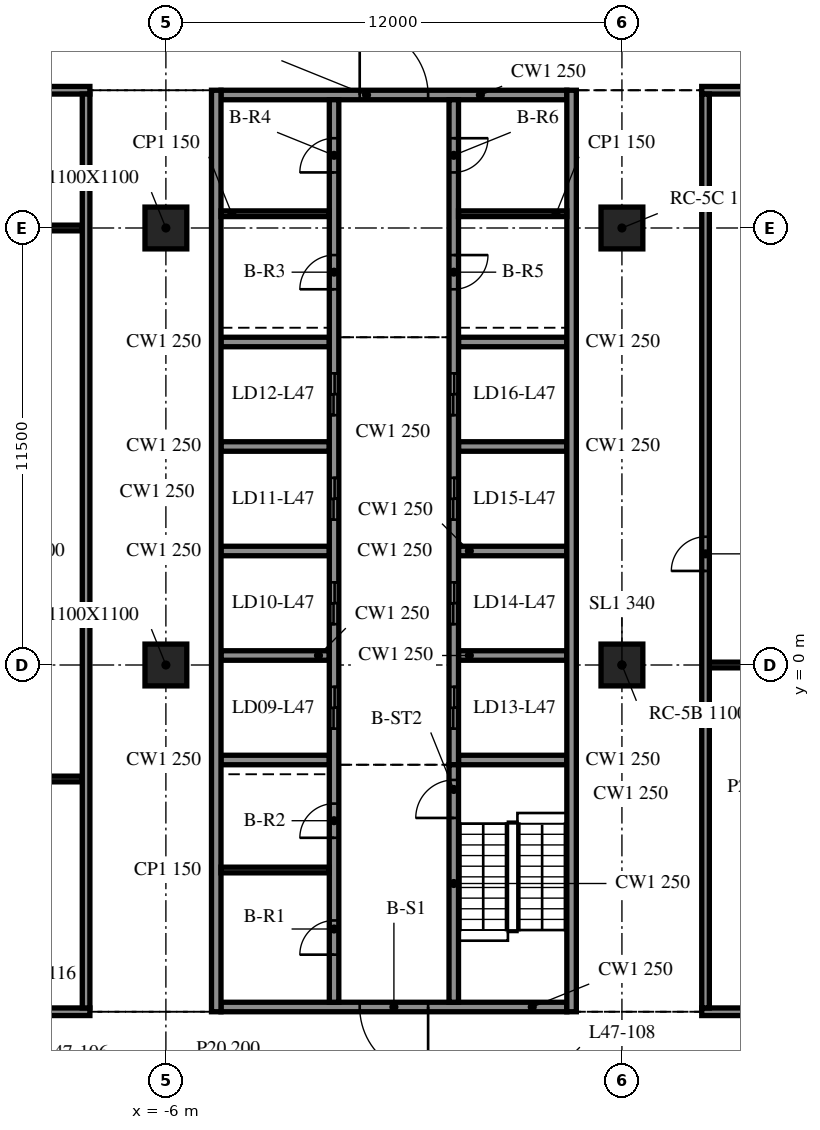
"""IFC4 building model, lengths in metres.
Left out: names, types, materials, properties, quantities, classifications, styles, units other than length and angle.
Written with IfcOpenShell. Run it as: python <this file> out.ifc"""

import sys

from ifc_helpers import new_model, si_unit, direction, frame, frame_2d, origin, origin_2d, place, context, subcontext, project, spatial, rectangle, extrude, element, fill, save


model = new_model("IFC4")
c1 = context("Model", 3, precision=1e-05, world=origin(), true_north=direction((0.0, 1.0)))
c2 = subcontext(c1, "Body", "Model", "MODEL_VIEW")
j1 = project(units=[si_unit("LENGTHUNIT", "METRE"), si_unit("PLANEANGLEUNIT", "RADIAN")], contexts=[c1])
p1 = place(None, origin())
s1 = spatial("IfcSite", under=j1, at=p1, CompositionType="ELEMENT")
p2 = place(p1, origin())
s2 = spatial("IfcBuilding", under=s1, at=p2, CompositionType="ELEMENT")
p3 = place(p2, frame((0.0, 0.0, 197.7)))
s3 = spatial("IfcBuildingStorey", under=s2, at=p3, CompositionType="ELEMENT", Elevation=197.7)
for number, where, z_axis, x_axis in (
    (1, (-6.0, 0.0, -0.34), (0.0, 0.0, 1.0), (1.0, 0.0, 0.0)),
    (2, (-6.0, 11.5, -0.34), (0.0, 0.0, 1.0), (1.0, 0.0, 0.0)),
    (3, (6.0, 0.0, -0.34), (0.0, 0.0, 1.0), (1.0, 0.0, 0.0)),
    (4, (6.0, 11.5, -0.34), (0.0, 0.0, 1.0), (1.0, 0.0, 0.0)),
):
    element("IfcColumn", number, at=place(p3, frame(where, z_axis=z_axis, x_axis=x_axis)), inside=s3, PredefinedType="COLUMN", context=c2, shape_type="SweptSolid", body=[
        extrude(rectangle(XDim=1.1, YDim=1.1, at=origin_2d()), origin(), (0.0, 0.0, 1.0), 3.8),
    ])
for number, where, z_axis, x_axis in (
    (5, (-4.675, 15.125, 0.0), (0.0, 0.0, 1.0), (0.0, -1.0, 0.0)),
    (6, (4.675, -9.125, 0.0), (0.0, 0.0, 1.0), (0.0, 1.0, 0.0)),
):
    element("IfcWall", number, at=place(p3, frame(where, z_axis=z_axis, x_axis=x_axis)), inside=s3, PredefinedType="SOLIDWALL", context=c2, shape_type="SweptSolid", body=[
        extrude(rectangle(XDim=24.25, YDim=0.25, at=frame_2d((12.125, 0.0))), origin(), (0.0, 0.0, 1.0), 3.46),
    ])
p4 = place(p3, frame((4.55, -9.0, 0.0), z_axis=(0.0, 0.0, 1.0), x_axis=(-1.0, 0.0, 0.0)))
e7 = element("IfcWall", 7, at=p4, inside=s3, PredefinedType="SOLIDWALL", context=c2, shape_type="SweptSolid", body=[
    extrude(rectangle(XDim=9.1, YDim=0.25, at=frame_2d((4.55, 0.0))), origin(), (0.0, 0.0, 1.0), 3.46),
])
p5 = place(p4, frame((3.65, 0.0, 0.0)))
e8 = element("IfcOpeningElement", 8, at=p5, cuts=e7, PredefinedType="OPENING", context=c2, shape_type="SweptSolid", body=[
    extrude(rectangle(XDim=1.8, YDim=2.1, at=frame_2d((0.9, 1.05))), frame((0.0, 0.135, 0.0), z_axis=(0.0, -1.0, 0.0), x_axis=(1.0, 0.0, 0.0)), (0.0, 0.0, 1.0), 0.27),
])
p6 = place(p3, frame((-4.55, 15.0, 0.0), z_axis=(0.0, 0.0, 1.0), x_axis=(1.0, 0.0, 0.0)))
e9 = element("IfcWall", 9, at=p6, inside=s3, PredefinedType="SOLIDWALL", context=c2, shape_type="SweptSolid", body=[
    extrude(rectangle(XDim=9.1, YDim=0.25, at=frame_2d((4.55, 0.0))), origin(), (0.0, 0.0, 1.0), 3.46),
])
p7 = place(p6, frame((3.65, 0.0, 0.0)))
e10 = element("IfcOpeningElement", 10, at=p7, cuts=e9, PredefinedType="OPENING", context=c2, shape_type="SweptSolid", body=[
    extrude(rectangle(XDim=1.8, YDim=2.1, at=frame_2d((0.9, 1.05))), frame((0.0, 0.135, 0.0), z_axis=(0.0, -1.0, 0.0), x_axis=(1.0, 0.0, 0.0)), (0.0, 0.0, 1.0), 0.27),
])
p8 = place(p3, frame((-1.575, -8.875, 0.0), z_axis=(0.0, 0.0, 1.0), x_axis=(0.0, 1.0, 0.0)))
e11 = element("IfcWall", 11, at=p8, inside=s3, PredefinedType="SOLIDWALL", context=c2, shape_type="SweptSolid", body=[
    extrude(rectangle(XDim=23.75, YDim=0.25, at=frame_2d((11.875, 0.0))), origin(), (0.0, 0.0, 1.0), 3.46),
])
p9 = place(p8, frame((7.2, 0.0, 0.0)))
e12 = element("IfcOpeningElement", 12, at=p9, cuts=e11, PredefinedType="OPENING", context=c2, shape_type="SweptSolid", body=[
    extrude(rectangle(XDim=1.1, YDim=2.1, at=frame_2d((0.55, 1.05))), frame((0.0, 0.135, 0.0), z_axis=(0.0, -1.0, 0.0), x_axis=(1.0, 0.0, 0.0)), (0.0, 0.0, 1.0), 0.27),
])
p10 = place(p8, frame((9.95, 0.0, 0.0)))
e13 = element("IfcOpeningElement", 13, at=p10, cuts=e11, PredefinedType="OPENING", context=c2, shape_type="SweptSolid", body=[
    extrude(rectangle(XDim=1.1, YDim=2.1, at=frame_2d((0.55, 1.05))), frame((0.0, 0.135, 0.0), z_axis=(0.0, -1.0, 0.0), x_axis=(1.0, 0.0, 0.0)), (0.0, 0.0, 1.0), 0.27),
])
p11 = place(p8, frame((12.7, 0.0, 0.0)))
e14 = element("IfcOpeningElement", 14, at=p11, cuts=e11, PredefinedType="OPENING", context=c2, shape_type="SweptSolid", body=[
    extrude(rectangle(XDim=1.1, YDim=2.1, at=frame_2d((0.55, 1.05))), frame((0.0, 0.135, 0.0), z_axis=(0.0, -1.0, 0.0), x_axis=(1.0, 0.0, 0.0)), (0.0, 0.0, 1.0), 0.27),
])
p12 = place(p8, frame((15.45, 0.0, 0.0)))
e15 = element("IfcOpeningElement", 15, at=p12, cuts=e11, PredefinedType="OPENING", context=c2, shape_type="SweptSolid", body=[
    extrude(rectangle(XDim=1.1, YDim=2.1, at=frame_2d((0.55, 1.05))), frame((0.0, 0.135, 0.0), z_axis=(0.0, -1.0, 0.0), x_axis=(1.0, 0.0, 0.0)), (0.0, 0.0, 1.0), 0.27),
])
p13 = place(p8, frame((1.252, 0.0, 0.0)))
e16 = element("IfcOpeningElement", 16, at=p13, cuts=e11, PredefinedType="OPENING", context=c2, shape_type="SweptSolid", body=[
    extrude(rectangle(XDim=0.9, YDim=2.1, at=frame_2d((0.45, 1.05))), frame((0.0, 0.135, 0.0), z_axis=(0.0, -1.0, 0.0), x_axis=(1.0, 0.0, 0.0)), (0.0, 0.0, 1.0), 0.27),
])
p14 = place(p8, frame((4.327, 0.0, 0.0)))
e17 = element("IfcOpeningElement", 17, at=p14, cuts=e11, PredefinedType="OPENING", context=c2, shape_type="SweptSolid", body=[
    extrude(rectangle(XDim=0.9, YDim=2.1, at=frame_2d((0.45, 1.05))), frame((0.0, 0.135, 0.0), z_axis=(0.0, -1.0, 0.0), x_axis=(1.0, 0.0, 0.0)), (0.0, 0.0, 1.0), 0.27),
])
p15 = place(p8, frame((18.762, 0.0, 0.0)))
e18 = element("IfcOpeningElement", 18, at=p15, cuts=e11, PredefinedType="OPENING", context=c2, shape_type="SweptSolid", body=[
    extrude(rectangle(XDim=0.9, YDim=2.1, at=frame_2d((0.45, 1.05))), frame((0.0, 0.135, 0.0), z_axis=(0.0, -1.0, 0.0), x_axis=(1.0, 0.0, 0.0)), (0.0, 0.0, 1.0), 0.27),
])
p16 = place(p8, frame((21.837, 0.0, 0.0)))
e19 = element("IfcOpeningElement", 19, at=p16, cuts=e11, PredefinedType="OPENING", context=c2, shape_type="SweptSolid", body=[
    extrude(rectangle(XDim=0.9, YDim=2.1, at=frame_2d((0.45, 1.05))), frame((0.0, 0.135, 0.0), z_axis=(0.0, -1.0, 0.0), x_axis=(1.0, 0.0, 0.0)), (0.0, 0.0, 1.0), 0.27),
])
p17 = place(p3, frame((1.575, -8.875, 0.0), z_axis=(0.0, 0.0, 1.0), x_axis=(0.0, 1.0, 0.0)))
e20 = element("IfcWall", 20, at=p17, inside=s3, PredefinedType="SOLIDWALL", context=c2, shape_type="SweptSolid", body=[
    extrude(rectangle(XDim=6.25, YDim=0.25, at=frame_2d((3.125, 0.0))), origin(), (0.0, 0.0, 1.0), 3.46),
])
p18 = place(p17, frame((4.85, 0.0, 0.0)))
e21 = element("IfcOpeningElement", 21, at=p18, cuts=e20, PredefinedType="OPENING", context=c2, shape_type="SweptSolid", body=[
    extrude(rectangle(XDim=1.0, YDim=2.1, at=frame_2d((0.5, 1.05))), frame((0.0, 0.135, 0.0), z_axis=(0.0, -1.0, 0.0), x_axis=(1.0, 0.0, 0.0)), (0.0, 0.0, 1.0), 0.27),
])
p19 = place(p3, frame((1.575, 14.875, 0.0), z_axis=(0.0, 0.0, 1.0), x_axis=(0.0, -1.0, 0.0)))
e22 = element("IfcWall", 22, at=p19, inside=s3, PredefinedType="SOLIDWALL", context=c2, shape_type="SweptSolid", body=[
    extrude(rectangle(XDim=17.5, YDim=0.25, at=frame_2d((8.75, 0.0))), origin(), (0.0, 0.0, 1.0), 3.46),
])
p20 = place(p19, frame((15.45, 0.0, 0.0)))
e23 = element("IfcOpeningElement", 23, at=p20, cuts=e22, PredefinedType="OPENING", context=c2, shape_type="SweptSolid", body=[
    extrude(rectangle(XDim=1.1, YDim=2.1, at=frame_2d((0.55, 1.05))), frame((0.0, 0.135, 0.0), z_axis=(0.0, -1.0, 0.0), x_axis=(1.0, 0.0, 0.0)), (0.0, 0.0, 1.0), 0.27),
])
p21 = place(p19, frame((12.7, 0.0, 0.0)))
e24 = element("IfcOpeningElement", 24, at=p21, cuts=e22, PredefinedType="OPENING", context=c2, shape_type="SweptSolid", body=[
    extrude(rectangle(XDim=1.1, YDim=2.1, at=frame_2d((0.55, 1.05))), frame((0.0, 0.135, 0.0), z_axis=(0.0, -1.0, 0.0), x_axis=(1.0, 0.0, 0.0)), (0.0, 0.0, 1.0), 0.27),
])
p22 = place(p19, frame((9.95, 0.0, 0.0)))
e25 = element("IfcOpeningElement", 25, at=p22, cuts=e22, PredefinedType="OPENING", context=c2, shape_type="SweptSolid", body=[
    extrude(rectangle(XDim=1.1, YDim=2.1, at=frame_2d((0.55, 1.05))), frame((0.0, 0.135, 0.0), z_axis=(0.0, -1.0, 0.0), x_axis=(1.0, 0.0, 0.0)), (0.0, 0.0, 1.0), 0.27),
])
p23 = place(p19, frame((7.2, 0.0, 0.0)))
e26 = element("IfcOpeningElement", 26, at=p23, cuts=e22, PredefinedType="OPENING", context=c2, shape_type="SweptSolid", body=[
    extrude(rectangle(XDim=1.1, YDim=2.1, at=frame_2d((0.55, 1.05))), frame((0.0, 0.135, 0.0), z_axis=(0.0, -1.0, 0.0), x_axis=(1.0, 0.0, 0.0)), (0.0, 0.0, 1.0), 0.27),
])
p24 = place(p19, frame((4.087, 0.0, 0.0)))
e27 = element("IfcOpeningElement", 27, at=p24, cuts=e22, PredefinedType="OPENING", context=c2, shape_type="SweptSolid", body=[
    extrude(rectangle(XDim=0.9, YDim=2.1, at=frame_2d((0.45, 1.05))), frame((0.0, 0.135, 0.0), z_axis=(0.0, -1.0, 0.0), x_axis=(1.0, 0.0, 0.0)), (0.0, 0.0, 1.0), 0.27),
])
p25 = place(p19, frame((1.012, 0.0, 0.0)))
e28 = element("IfcOpeningElement", 28, at=p25, cuts=e22, PredefinedType="OPENING", context=c2, shape_type="SweptSolid", body=[
    extrude(rectangle(XDim=0.9, YDim=2.1, at=frame_2d((0.45, 1.05))), frame((0.0, 0.135, 0.0), z_axis=(0.0, -1.0, 0.0), x_axis=(1.0, 0.0, 0.0)), (0.0, 0.0, 1.0), 0.27),
])
for number, where, z_axis, x_axis in (
    (29, (-4.55, -2.5, 0.0), (0.0, 0.0, 1.0), (1.0, 0.0, 0.0)),
    (30, (-4.55, 0.25, 0.0), (0.0, 0.0, 1.0), (1.0, 0.0, 0.0)),
    (31, (-4.55, 3.0, 0.0), (0.0, 0.0, 1.0), (1.0, 0.0, 0.0)),
    (32, (-4.55, 5.75, 0.0), (0.0, 0.0, 1.0), (1.0, 0.0, 0.0)),
    (33, (-4.55, 8.5, 0.0), (0.0, 0.0, 1.0), (1.0, 0.0, 0.0)),
    (34, (1.7, -2.5, 0.0), (0.0, 0.0, 1.0), (1.0, 0.0, 0.0)),
    (35, (1.7, 0.25, 0.0), (0.0, 0.0, 1.0), (1.0, 0.0, 0.0)),
    (36, (1.7, 3.0, 0.0), (0.0, 0.0, 1.0), (1.0, 0.0, 0.0)),
    (37, (1.7, 5.75, 0.0), (0.0, 0.0, 1.0), (1.0, 0.0, 0.0)),
    (38, (1.7, 8.5, 0.0), (0.0, 0.0, 1.0), (1.0, 0.0, 0.0)),
):
    element("IfcWall", number, at=place(p3, frame(where, z_axis=z_axis, x_axis=x_axis)), inside=s3, PredefinedType="SOLIDWALL", context=c2, shape_type="SweptSolid", body=[
        extrude(rectangle(XDim=2.85, YDim=0.25, at=frame_2d((1.425, 0.0))), origin(), (0.0, 0.0, 1.0), 3.46),
    ])
for number, where, z_axis, x_axis in (
    (39, (-4.55, -5.395, 0.0), (0.0, 0.0, 1.0), (1.0, 0.0, 0.0)),
    (40, (-4.55, 11.875, 0.0), (0.0, 0.0, 1.0), (1.0, 0.0, 0.0)),
    (41, (1.7, 11.875, 0.0), (0.0, 0.0, 1.0), (1.0, 0.0, 0.0)),
):
    element("IfcWall", number, at=place(p3, frame(where, z_axis=z_axis, x_axis=x_axis)), inside=s3, PredefinedType="PARTITIONING", context=c2, shape_type="SweptSolid", body=[
        extrude(rectangle(XDim=2.85, YDim=0.15, at=frame_2d((1.425, 0.0))), origin(), (0.0, 0.0, 1.0), 3.46),
    ])
p26 = place(p3, frame((-16.1, -9.125, 0.0), z_axis=(0.0, 0.0, 1.0), x_axis=(1.0, 0.0, 0.0)))
e42 = element("IfcWall", 42, at=p26, inside=s3, PredefinedType="PARTITIONING", context=c2, shape_type="SweptSolid", body=[
    extrude(rectangle(XDim=8.1, YDim=0.2, at=frame_2d((4.05, 0.0))), origin(), (0.0, 0.0, 1.0), 3.46),
])
p27 = place(p26, frame((3.5, 0.0, 0.0)))
e43 = element("IfcOpeningElement", 43, at=p27, cuts=e42, PredefinedType="OPENING", context=c2, shape_type="SweptSolid", body=[
    extrude(rectangle(XDim=1.0, YDim=2.1, at=frame_2d((0.5, 1.05))), frame((0.0, 0.11, 0.0), z_axis=(0.0, -1.0, 0.0), x_axis=(1.0, 0.0, 0.0)), (0.0, 0.0, 1.0), 0.22),
])
p28 = place(p3, frame((8.1, -9.125, 0.0), z_axis=(0.0, 0.0, 1.0), x_axis=(1.0, 0.0, 0.0)))
e44 = element("IfcWall", 44, at=p28, inside=s3, PredefinedType="PARTITIONING", context=c2, shape_type="SweptSolid", body=[
    extrude(rectangle(XDim=7.7, YDim=0.2, at=frame_2d((3.85, 0.0))), origin(), (0.0, 0.0, 1.0), 3.46),
])
p29 = place(p28, frame((3.3, 0.0, 0.0)))
e45 = element("IfcOpeningElement", 45, at=p29, cuts=e44, PredefinedType="OPENING", context=c2, shape_type="SweptSolid", body=[
    extrude(rectangle(XDim=1.0, YDim=2.1, at=frame_2d((0.5, 1.05))), frame((0.0, 0.11, 0.0), z_axis=(0.0, -1.0, 0.0), x_axis=(1.0, 0.0, 0.0)), (0.0, 0.0, 1.0), 0.22),
])
p30 = place(p3, frame((-15.9, -3.0, 0.0), z_axis=(0.0, 0.0, 1.0), x_axis=(1.0, 0.0, 0.0)))
e46 = element("IfcWall", 46, at=p30, inside=s3, PredefinedType="PARTITIONING", context=c2, shape_type="SweptSolid", body=[
    extrude(rectangle(XDim=7.7, YDim=0.15, at=frame_2d((3.85, 0.0))), origin(), (0.0, 0.0, 1.0), 3.46),
])
p31 = place(p3, frame((8.3, 0.0, 0.0), z_axis=(0.0, 0.0, 1.0), x_axis=(1.0, 0.0, 0.0)))
e47 = element("IfcWall", 47, at=p31, inside=s3, PredefinedType="PARTITIONING", context=c2, shape_type="SweptSolid", body=[
    extrude(rectangle(XDim=7.3, YDim=0.15, at=frame_2d((3.65, 0.0))), origin(), (0.0, 0.0, 1.0), 3.46),
])
p32 = place(p3, frame((-15.9, 11.5, 0.0), z_axis=(0.0, 0.0, 1.0), x_axis=(1.0, 0.0, 0.0)))
e48 = element("IfcWall", 48, at=p32, inside=s3, PredefinedType="PARTITIONING", context=c2, shape_type="SweptSolid", body=[
    extrude(rectangle(XDim=7.7, YDim=0.15, at=frame_2d((3.85, 0.0))), origin(), (0.0, 0.0, 1.0), 3.46),
])
p33 = place(p3, frame((-16.1, 15.125, 0.0), z_axis=(0.0, 0.0, 1.0), x_axis=(1.0, 0.0, 0.0)))
e49 = element("IfcWall", 49, at=p33, inside=s3, PredefinedType="PARTITIONING", context=c2, shape_type="SweptSolid", body=[
    extrude(rectangle(XDim=8.1, YDim=0.2, at=frame_2d((4.05, 0.0))), origin(), (0.0, 0.0, 1.0), 3.46),
])
p34 = place(p33, frame((3.5, 0.0, 0.0)))
e50 = element("IfcOpeningElement", 50, at=p34, cuts=e49, PredefinedType="OPENING", context=c2, shape_type="SweptSolid", body=[
    extrude(rectangle(XDim=1.0, YDim=2.1, at=frame_2d((0.5, 1.05))), frame((0.0, 0.11, 0.0), z_axis=(0.0, -1.0, 0.0), x_axis=(1.0, 0.0, 0.0)), (0.0, 0.0, 1.0), 0.22),
])
p35 = place(p3, frame((8.1, 15.125, 0.0), z_axis=(0.0, 0.0, 1.0), x_axis=(1.0, 0.0, 0.0)))
e51 = element("IfcWall", 51, at=p35, inside=s3, PredefinedType="PARTITIONING", context=c2, shape_type="SweptSolid", body=[
    extrude(rectangle(XDim=7.7, YDim=0.2, at=frame_2d((3.85, 0.0))), origin(), (0.0, 0.0, 1.0), 3.46),
])
p36 = place(p3, frame((-8.1, -9.025, 0.0), z_axis=(0.0, 0.0, 1.0), x_axis=(0.0, 1.0, 0.0)))
e52 = element("IfcWall", 52, at=p36, inside=s3, PredefinedType="PARTITIONING", context=c2, shape_type="SweptSolid", body=[
    extrude(rectangle(XDim=24.05, YDim=0.2, at=frame_2d((12.025, 0.0))), origin(), (0.0, 0.0, 1.0), 3.46),
])
p37 = place(p3, frame((8.2, -9.025, 0.0), z_axis=(0.0, 0.0, 1.0), x_axis=(0.0, 1.0, 0.0)))
e53 = element("IfcWall", 53, at=p37, inside=s3, PredefinedType="PARTITIONING", context=c2, shape_type="SweptSolid", body=[
    extrude(rectangle(XDim=24.05, YDim=0.2, at=frame_2d((12.025, 0.0))), origin(), (0.0, 0.0, 1.0), 3.46),
])
p38 = place(p37, frame((11.5, 0.0, 0.0)))
e54 = element("IfcOpeningElement", 54, at=p38, cuts=e53, PredefinedType="OPENING", context=c2, shape_type="SweptSolid", body=[
    extrude(rectangle(XDim=0.9, YDim=2.1, at=frame_2d((0.45, 1.05))), frame((0.0, 0.11, 0.0), z_axis=(0.0, -1.0, 0.0), x_axis=(1.0, 0.0, 0.0)), (0.0, 0.0, 1.0), 0.22),
])
p39 = place(p5, origin())
e55 = element("IfcDoor", 55, at=p39, inside=s3, OperationType="DOUBLE_DOOR_SINGLE_SWING", PredefinedType="DOOR", context=c2, shape_type="SweptSolid", body=[
    extrude(rectangle(XDim=1.8, YDim=2.1, at=frame_2d((0.9, 1.05))), frame((0.0, 0.025, 0.0), z_axis=(0.0, -1.0, 0.0), x_axis=(1.0, 0.0, 0.0)), (0.0, 0.0, 1.0), 0.05),
])
fill(e8, e55)
p40 = place(p7, origin())
e56 = element("IfcDoor", 56, at=p40, inside=s3, OperationType="DOUBLE_DOOR_SINGLE_SWING", PredefinedType="DOOR", context=c2, shape_type="SweptSolid", body=[
    extrude(rectangle(XDim=1.8, YDim=2.1, at=frame_2d((0.9, 1.05))), frame((0.0, 0.025, 0.0), z_axis=(0.0, -1.0, 0.0), x_axis=(1.0, 0.0, 0.0)), (0.0, 0.0, 1.0), 0.05),
])
fill(e10, e56)
p41 = place(p20, origin())
e57 = element("IfcDoor", 57, at=p41, inside=s3, OperationType="DOUBLE_DOOR_SLIDING", PredefinedType="DOOR", context=c2, shape_type="SweptSolid", body=[
    extrude(rectangle(XDim=1.1, YDim=2.1, at=frame_2d((0.55, 1.05))), frame((0.0, 0.025, 0.0), z_axis=(0.0, -1.0, 0.0), x_axis=(1.0, 0.0, 0.0)), (0.0, 0.0, 1.0), 0.05),
])
fill(e23, e57)
p42 = place(p21, origin())
e58 = element("IfcDoor", 58, at=p42, inside=s3, OperationType="DOUBLE_DOOR_SLIDING", PredefinedType="DOOR", context=c2, shape_type="SweptSolid", body=[
    extrude(rectangle(XDim=1.1, YDim=2.1, at=frame_2d((0.55, 1.05))), frame((0.0, 0.025, 0.0), z_axis=(0.0, -1.0, 0.0), x_axis=(1.0, 0.0, 0.0)), (0.0, 0.0, 1.0), 0.05),
])
fill(e24, e58)
p43 = place(p22, origin())
e59 = element("IfcDoor", 59, at=p43, inside=s3, OperationType="DOUBLE_DOOR_SLIDING", PredefinedType="DOOR", context=c2, shape_type="SweptSolid", body=[
    extrude(rectangle(XDim=1.1, YDim=2.1, at=frame_2d((0.55, 1.05))), frame((0.0, 0.025, 0.0), z_axis=(0.0, -1.0, 0.0), x_axis=(1.0, 0.0, 0.0)), (0.0, 0.0, 1.0), 0.05),
])
fill(e25, e59)
p44 = place(p23, origin())
e60 = element("IfcDoor", 60, at=p44, inside=s3, OperationType="DOUBLE_DOOR_SLIDING", PredefinedType="DOOR", context=c2, shape_type="SweptSolid", body=[
    extrude(rectangle(XDim=1.1, YDim=2.1, at=frame_2d((0.55, 1.05))), frame((0.0, 0.025, 0.0), z_axis=(0.0, -1.0, 0.0), x_axis=(1.0, 0.0, 0.0)), (0.0, 0.0, 1.0), 0.05),
])
fill(e26, e60)
p45 = place(p9, origin())
e61 = element("IfcDoor", 61, at=p45, inside=s3, OperationType="DOUBLE_DOOR_SLIDING", PredefinedType="DOOR", context=c2, shape_type="SweptSolid", body=[
    extrude(rectangle(XDim=1.1, YDim=2.1, at=frame_2d((0.55, 1.05))), frame((0.0, 0.025, 0.0), z_axis=(0.0, -1.0, 0.0), x_axis=(1.0, 0.0, 0.0)), (0.0, 0.0, 1.0), 0.05),
])
fill(e12, e61)
p46 = place(p10, origin())
e62 = element("IfcDoor", 62, at=p46, inside=s3, OperationType="DOUBLE_DOOR_SLIDING", PredefinedType="DOOR", context=c2, shape_type="SweptSolid", body=[
    extrude(rectangle(XDim=1.1, YDim=2.1, at=frame_2d((0.55, 1.05))), frame((0.0, 0.025, 0.0), z_axis=(0.0, -1.0, 0.0), x_axis=(1.0, 0.0, 0.0)), (0.0, 0.0, 1.0), 0.05),
])
fill(e13, e62)
p47 = place(p11, origin())
e63 = element("IfcDoor", 63, at=p47, inside=s3, OperationType="DOUBLE_DOOR_SLIDING", PredefinedType="DOOR", context=c2, shape_type="SweptSolid", body=[
    extrude(rectangle(XDim=1.1, YDim=2.1, at=frame_2d((0.55, 1.05))), frame((0.0, 0.025, 0.0), z_axis=(0.0, -1.0, 0.0), x_axis=(1.0, 0.0, 0.0)), (0.0, 0.0, 1.0), 0.05),
])
fill(e14, e63)
p48 = place(p12, origin())
e64 = element("IfcDoor", 64, at=p48, inside=s3, OperationType="DOUBLE_DOOR_SLIDING", PredefinedType="DOOR", context=c2, shape_type="SweptSolid", body=[
    extrude(rectangle(XDim=1.1, YDim=2.1, at=frame_2d((0.55, 1.05))), frame((0.0, 0.025, 0.0), z_axis=(0.0, -1.0, 0.0), x_axis=(1.0, 0.0, 0.0)), (0.0, 0.0, 1.0), 0.05),
])
fill(e15, e64)
p49 = place(p13, origin())
e65 = element("IfcDoor", 65, at=p49, inside=s3, OperationType="SINGLE_SWING_LEFT", PredefinedType="DOOR", context=c2, shape_type="SweptSolid", body=[
    extrude(rectangle(XDim=0.9, YDim=2.1, at=frame_2d((0.45, 1.05))), frame((0.0, 0.025, 0.0), z_axis=(0.0, -1.0, 0.0), x_axis=(1.0, 0.0, 0.0)), (0.0, 0.0, 1.0), 0.05),
])
fill(e16, e65)
p50 = place(p14, origin())
e66 = element("IfcDoor", 66, at=p50, inside=s3, OperationType="SINGLE_SWING_RIGHT", PredefinedType="DOOR", context=c2, shape_type="SweptSolid", body=[
    extrude(rectangle(XDim=0.9, YDim=2.1, at=frame_2d((0.45, 1.05))), frame((0.0, 0.025, 0.0), z_axis=(0.0, -1.0, 0.0), x_axis=(1.0, 0.0, 0.0)), (0.0, 0.0, 1.0), 0.05),
])
fill(e17, e66)
p51 = place(p15, origin())
e67 = element("IfcDoor", 67, at=p51, inside=s3, OperationType="SINGLE_SWING_LEFT", PredefinedType="DOOR", context=c2, shape_type="SweptSolid", body=[
    extrude(rectangle(XDim=0.9, YDim=2.1, at=frame_2d((0.45, 1.05))), frame((0.0, 0.025, 0.0), z_axis=(0.0, -1.0, 0.0), x_axis=(1.0, 0.0, 0.0)), (0.0, 0.0, 1.0), 0.05),
])
fill(e18, e67)
p52 = place(p16, origin())
e68 = element("IfcDoor", 68, at=p52, inside=s3, OperationType="SINGLE_SWING_RIGHT", PredefinedType="DOOR", context=c2, shape_type="SweptSolid", body=[
    extrude(rectangle(XDim=0.9, YDim=2.1, at=frame_2d((0.45, 1.05))), frame((0.0, 0.025, 0.0), z_axis=(0.0, -1.0, 0.0), x_axis=(1.0, 0.0, 0.0)), (0.0, 0.0, 1.0), 0.05),
])
fill(e19, e68)
p53 = place(p24, origin())
e69 = element("IfcDoor", 69, at=p53, inside=s3, OperationType="SINGLE_SWING_LEFT", PredefinedType="DOOR", context=c2, shape_type="SweptSolid", body=[
    extrude(rectangle(XDim=0.9, YDim=2.1, at=frame_2d((0.45, 1.05))), frame((0.0, 0.025, 0.0), z_axis=(0.0, -1.0, 0.0), x_axis=(1.0, 0.0, 0.0)), (0.0, 0.0, 1.0), 0.05),
])
fill(e27, e69)
p54 = place(p25, origin())
e70 = element("IfcDoor", 70, at=p54, inside=s3, OperationType="SINGLE_SWING_RIGHT", PredefinedType="DOOR", context=c2, shape_type="SweptSolid", body=[
    extrude(rectangle(XDim=0.9, YDim=2.1, at=frame_2d((0.45, 1.05))), frame((0.0, 0.025, 0.0), z_axis=(0.0, -1.0, 0.0), x_axis=(1.0, 0.0, 0.0)), (0.0, 0.0, 1.0), 0.05),
])
fill(e28, e70)
p55 = place(p18, origin())
e71 = element("IfcDoor", 71, at=p55, inside=s3, OperationType="SINGLE_SWING_LEFT", PredefinedType="DOOR", context=c2, shape_type="SweptSolid", body=[
    extrude(rectangle(XDim=1.0, YDim=2.1, at=frame_2d((0.5, 1.05))), frame((0.0, 0.025, 0.0), z_axis=(0.0, -1.0, 0.0), x_axis=(1.0, 0.0, 0.0)), (0.0, 0.0, 1.0), 0.05),
])
fill(e21, e71)
p56 = place(p38, origin())
e72 = element("IfcDoor", 72, at=p56, inside=s3, OperationType="SINGLE_SWING_RIGHT", PredefinedType="DOOR", context=c2, shape_type="SweptSolid", body=[
    extrude(rectangle(XDim=0.9, YDim=2.1, at=frame_2d((0.45, 1.05))), frame((0.0, 0.025, 0.0), z_axis=(0.0, -1.0, 0.0), x_axis=(1.0, 0.0, 0.0)), (0.0, 0.0, 1.0), 0.05),
])
fill(e54, e72)
save(model, sys.argv[1])
